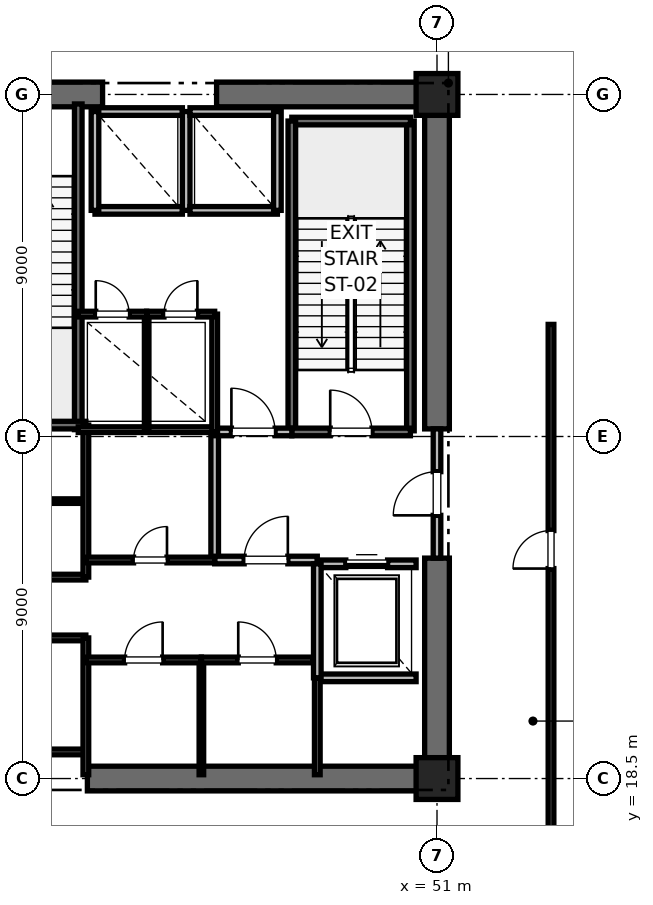
"""IFC4 building model, lengths in metres.
Left out: names, types, materials, properties, quantities, classifications, styles, units other than length and angle.
Written with IfcOpenShell. Run it as: python <this file> out.ifc"""

import sys

from ifc_helpers import new_model, si_unit, direction, frame, frame_2d, origin, origin_2d, place, context, subcontext, project, spatial, rectangle, extrude, element, fill, save


model = new_model("IFC4")
c1 = context("Model", 3, precision=1e-05, world=origin(), true_north=direction((0.0, 1.0)))
c2 = subcontext(c1, "Body", "Model", "MODEL_VIEW")
j1 = project(units=[si_unit("LENGTHUNIT", "METRE"), si_unit("PLANEANGLEUNIT", "RADIAN")], contexts=[c1])
p1 = place(None, origin())
s1 = spatial("IfcSite", under=j1, at=p1, CompositionType="ELEMENT")
p2 = place(p1, origin())
s2 = spatial("IfcBuilding", under=s1, at=p2, CompositionType="ELEMENT")
p3 = place(p2, frame((0.0, 0.0, 6.0)))
s3 = spatial("IfcBuildingStorey", under=s2, at=p3, CompositionType="ELEMENT", Elevation=6.0)
for number, where, z_axis, x_axis in (
    (1, (51.0, 18.5, 0.0), (0.0, 0.0, 1.0), (1.0, 0.0, 0.0)),
    (2, (51.0, 36.5, 0.0), (0.0, 0.0, 1.0), (1.0, 0.0, 0.0)),
):
    element("IfcColumn", number, at=place(p3, frame(where, z_axis=z_axis, x_axis=x_axis)), inside=s3, PredefinedType="PILASTER", context=c2, shape_type="SweptSolid", body=[
        extrude(rectangle(XDim=1.1, YDim=1.1, at=origin_2d()), origin(), (0.0, 0.0, 1.0), 5.2),
    ])
p4 = place(p3, frame((41.8, 18.5, 0.0), z_axis=(0.0, 0.0, 1.0), x_axis=(1.0, 0.0, 0.0)))
e3 = element("IfcWall", 3, at=p4, inside=s3, PredefinedType="SHEAR", context=c2, shape_type="SweptSolid", body=[
    extrude(rectangle(XDim=9.2, YDim=0.65, at=frame_2d((4.6, 0.0))), origin(), (0.0, 0.0, 1.0), 4.92),
])
p5 = place(p3, frame((37.8, 36.5, 0.0), z_axis=(0.0, 0.0, 1.0), x_axis=(1.0, 0.0, 0.0)))
e4 = element("IfcWall", 4, at=p5, inside=s3, PredefinedType="SHEAR", context=c2, shape_type="SweptSolid", body=[
    extrude(rectangle(XDim=4.4, YDim=0.65, at=frame_2d((2.2, 0.0))), origin(), (0.0, 0.0, 1.0), 4.92),
])
p6 = place(p5, frame((1.65, 0.0, 0.0)))
e5 = element("IfcOpeningElement", 5, at=p6, cuts=e4, PredefinedType="OPENING", context=c2, shape_type="SweptSolid", body=[
    extrude(rectangle(XDim=1.1, YDim=2.15, at=frame_2d((0.55, 1.075))), frame((0.0, 0.325, 0.0), z_axis=(0.0, -1.0, 0.0), x_axis=(1.0, 0.0, 0.0)), (0.0, 0.0, 1.0), 0.65),
])
for number, where, z_axis, x_axis in (
    (6, (45.2, 36.5, 0.0), (0.0, 0.0, 1.0), (1.0, 0.0, 0.0)),
    (7, (51.0, 18.5, 0.0), (0.0, 0.0, 1.0), (0.0, 1.0, 0.0)),
):
    element("IfcWall", number, at=place(p3, frame(where, z_axis=z_axis, x_axis=x_axis)), inside=s3, PredefinedType="SHEAR", context=c2, shape_type="SweptSolid", body=[
        extrude(rectangle(XDim=5.8, YDim=0.65, at=frame_2d((2.9, 0.0))), origin(), (0.0, 0.0, 1.0), 4.92),
    ])
p7 = place(p3, frame((51.0, 27.7, 0.0), z_axis=(0.0, 0.0, 1.0), x_axis=(0.0, 1.0, 0.0)))
e8 = element("IfcWall", 8, at=p7, inside=s3, PredefinedType="SHEAR", context=c2, shape_type="SweptSolid", body=[
    extrude(rectangle(XDim=8.8, YDim=0.65, at=frame_2d((4.4, 0.0))), origin(), (0.0, 0.0, 1.0), 4.92),
])
p8 = place(p3, frame((50.3, 27.65, 0.0), z_axis=(0.0, 0.0, 1.0), x_axis=(0.0, 1.0, 0.0)))
e9 = element("IfcWall", 9, at=p8, inside=s3, PredefinedType="SOLIDWALL", context=c2, shape_type="SweptSolid", body=[
    extrude(rectangle(XDim=8.15, YDim=0.2, at=frame_2d((4.075, 0.0))), origin(), (0.0, 0.0, 1.0), 4.92),
])
p9 = place(p3, frame((47.18, 35.8, 0.0), z_axis=(0.0, 0.0, 1.0), x_axis=(1.0, 0.0, 0.0)))
e10 = element("IfcWall", 10, at=p9, inside=s3, PredefinedType="SOLIDWALL", context=c2, shape_type="SweptSolid", body=[
    extrude(rectangle(XDim=3.12, YDim=0.2, at=frame_2d((1.56, 0.0))), origin(), (0.0, 0.0, 1.0), 4.92),
])
p10 = place(p3, frame((47.18, 27.62, 0.0), z_axis=(0.0, 0.0, 1.0), x_axis=(0.0, 1.0, 0.0)))
e11 = element("IfcWall", 11, at=p10, inside=s3, PredefinedType="SOLIDWALL", context=c2, shape_type="SweptSolid", body=[
    extrude(rectangle(XDim=8.18, YDim=0.2, at=frame_2d((4.09, 0.0))), origin(), (0.0, 0.0, 1.0), 4.92),
])
p11 = place(p3, frame((47.18, 27.62, 0.0), z_axis=(0.0, 0.0, 1.0), x_axis=(1.0, 0.0, 0.0)))
e12 = element("IfcWall", 12, at=p11, inside=s3, PredefinedType="SOLIDWALL", context=c2, shape_type="SweptSolid", body=[
    extrude(rectangle(XDim=3.12, YDim=0.2, at=frame_2d((1.56, 0.0))), origin(), (0.0, 0.0, 1.0), 4.92),
])
p12 = place(p11, frame((1.01, 0.0, 0.0)))
e13 = element("IfcOpeningElement", 13, at=p12, cuts=e12, PredefinedType="OPENING", context=c2, shape_type="SweptSolid", body=[
    extrude(rectangle(XDim=1.1, YDim=2.15, at=frame_2d((0.55, 1.075))), frame((0.0, 0.1, 0.0), z_axis=(0.0, -1.0, 0.0), x_axis=(1.0, 0.0, 0.0)), (0.0, 0.0, 1.0), 0.2),
])
p13 = place(p3, frame((41.56, 27.68, 0.0), z_axis=(0.0, 0.0, 1.0), x_axis=(0.0, 1.0, 0.0)))
e14 = element("IfcWall", 14, at=p13, inside=s3, PredefinedType="SOLIDWALL", context=c2, shape_type="SweptSolid", body=[
    extrude(rectangle(XDim=8.57, YDim=0.2, at=frame_2d((4.285, 0.0))), origin(), (0.0, 0.0, 1.0), 4.92),
])
p14 = place(p3, frame((38.44, 27.8, 0.0), z_axis=(0.0, 0.0, 1.0), x_axis=(1.0, 0.0, 0.0)))
e15 = element("IfcWall", 15, at=p14, inside=s3, PredefinedType="SOLIDWALL", context=c2, shape_type="SweptSolid", body=[
    extrude(rectangle(XDim=3.32, YDim=0.2, at=frame_2d((1.66, 0.0))), origin(), (0.0, 0.0, 1.0), 4.92),
])
p15 = place(p3, frame((45.15, 24.25, 0.0), z_axis=(0.0, 0.0, 1.0), x_axis=(0.0, 1.0, 0.0)))
e16 = element("IfcWall", 16, at=p15, inside=s3, PredefinedType="PARTITIONING", context=c2, shape_type="SweptSolid", body=[
    extrude(rectangle(XDim=3.37, YDim=0.2, at=frame_2d((1.685, 0.0))), origin(), (0.0, 0.0, 1.0), 4.92),
])
p16 = place(p3, frame((45.15, 24.25, 0.0), z_axis=(0.0, 0.0, 1.0), x_axis=(1.0, 0.0, 0.0)))
e17 = element("IfcWall", 17, at=p16, inside=s3, PredefinedType="PARTITIONING", context=c2, shape_type="SweptSolid", body=[
    extrude(rectangle(XDim=2.7, YDim=0.2, at=frame_2d((1.35, 0.0))), origin(), (0.0, 0.0, 1.0), 4.92),
])
p17 = place(p16, frame((0.775, 0.0, 0.0)))
e18 = element("IfcOpeningElement", 18, at=p17, cuts=e17, PredefinedType="OPENING", context=c2, shape_type="SweptSolid", body=[
    extrude(rectangle(XDim=1.15, YDim=2.2, at=frame_2d((0.575, 1.1))), frame((0.0, 0.1, 0.0), z_axis=(0.0, -1.0, 0.0), x_axis=(1.0, 0.0, 0.0)), (0.0, 0.0, 1.0), 0.2),
])
p18 = place(p3, frame((45.15, 27.62, 0.0), z_axis=(0.0, 0.0, 1.0), x_axis=(1.0, 0.0, 0.0)))
e19 = element("IfcWall", 19, at=p18, inside=s3, PredefinedType="PARTITIONING", context=c2, shape_type="SweptSolid", body=[
    extrude(rectangle(XDim=2.03, YDim=0.2, at=frame_2d((1.015, 0.0))), origin(), (0.0, 0.0, 1.0), 4.92),
])
p19 = place(p18, frame((0.44, 0.0, 0.0)))
e20 = element("IfcOpeningElement", 20, at=p19, cuts=e19, PredefinedType="OPENING", context=c2, shape_type="SweptSolid", body=[
    extrude(rectangle(XDim=1.15, YDim=2.2, at=frame_2d((0.575, 1.1))), frame((0.0, 0.1, 0.0), z_axis=(0.0, -1.0, 0.0), x_axis=(1.0, 0.0, 0.0)), (0.0, 0.0, 1.0), 0.2),
])
p20 = place(p3, frame((51.0, 24.3, 0.0), z_axis=(0.0, 0.0, 1.0), x_axis=(0.0, 1.0, 0.0)))
e21 = element("IfcWall", 21, at=p20, inside=s3, PredefinedType="PARTITIONING", context=c2, shape_type="SweptSolid", body=[
    extrude(rectangle(XDim=3.4, YDim=0.2, at=frame_2d((1.7, 0.0))), origin(), (0.0, 0.0, 1.0), 3.7),
])
p21 = place(p20, frame((1.125, 0.0, 0.0)))
e22 = element("IfcOpeningElement", 22, at=p21, cuts=e21, PredefinedType="OPENING", context=c2, shape_type="SweptSolid", body=[
    extrude(rectangle(XDim=1.15, YDim=2.2, at=frame_2d((0.575, 1.1))), frame((0.0, 0.1, 0.0), z_axis=(0.0, -1.0, 0.0), x_axis=(1.0, 0.0, 0.0)), (0.0, 0.0, 1.0), 0.2),
])
p22 = place(p3, frame((47.85, 21.15, 0.0), z_axis=(0.0, 0.0, 1.0), x_axis=(1.0, 0.0, 0.0)))
e23 = element("IfcWall", 23, at=p22, inside=s3, PredefinedType="SOLIDWALL", context=c2, shape_type="SweptSolid", body=[
    extrude(rectangle(XDim=2.6, YDim=0.2, at=frame_2d((1.3, 0.0))), origin(), (0.0, 0.0, 1.0), 4.92),
])
p23 = place(p3, frame((50.45, 24.15, 0.0), z_axis=(0.0, 0.0, 1.0), x_axis=(-1.0, 0.0, 0.0)))
e24 = element("IfcWall", 24, at=p23, inside=s3, PredefinedType="SOLIDWALL", context=c2, shape_type="SweptSolid", body=[
    extrude(rectangle(XDim=2.6, YDim=0.2, at=frame_2d((1.3, 0.0))), origin(), (0.0, 0.0, 1.0), 3.7),
])
p24 = place(p23, frame((0.75, 0.0, 0.0)))
e25 = element("IfcOpeningElement", 25, at=p24, cuts=e24, PredefinedType="OPENING", context=c2, shape_type="SweptSolid", body=[
    extrude(rectangle(XDim=1.1, YDim=2.2, at=frame_2d((0.55, 1.1))), frame((0.0, 0.1, 0.0), z_axis=(0.0, -1.0, 0.0), x_axis=(1.0, 0.0, 0.0)), (0.0, 0.0, 1.0), 0.2),
])
p25 = place(p3, frame((47.85, 24.15, 0.0), z_axis=(0.0, 0.0, 1.0), x_axis=(0.0, -1.0, 0.0)))
e26 = element("IfcWall", 26, at=p25, inside=s3, PredefinedType="SOLIDWALL", context=c2, shape_type="SweptSolid", body=[
    extrude(rectangle(XDim=3.0, YDim=0.2, at=frame_2d((1.5, 0.0))), origin(), (0.0, 0.0, 1.0), 4.92),
])
p26 = place(p3, frame((42.0, 33.45, 0.0), z_axis=(0.0, 0.0, 1.0), x_axis=(1.0, 0.0, 0.0)))
e27 = element("IfcWall", 27, at=p26, inside=s3, PredefinedType="SOLIDWALL", context=c2, shape_type="SweptSolid", body=[
    extrude(rectangle(XDim=2.3, YDim=0.2, at=frame_2d((1.15, 0.0))), origin(), (0.0, 0.0, 1.0), 4.92),
])
p27 = place(p3, frame((44.3, 36.05, 0.0), z_axis=(0.0, 0.0, 1.0), x_axis=(-1.0, 0.0, 0.0)))
e28 = element("IfcWall", 28, at=p27, inside=s3, PredefinedType="SOLIDWALL", context=c2, shape_type="SweptSolid", body=[
    extrude(rectangle(XDim=2.3, YDim=0.2, at=frame_2d((1.15, 0.0))), origin(), (0.0, 0.0, 1.0), 3.7),
])
for number, where, z_axis, x_axis in (
    (29, (42.0, 36.05, 0.0), (0.0, 0.0, 1.0), (0.0, -1.0, 0.0)),
    (30, (44.4, 33.45, 0.0), (0.0, 0.0, 1.0), (0.0, 1.0, 0.0)),
):
    element("IfcWall", number, at=place(p3, frame(where, z_axis=z_axis, x_axis=x_axis)), inside=s3, PredefinedType="SOLIDWALL", context=c2, shape_type="SweptSolid", body=[
        extrude(rectangle(XDim=2.6, YDim=0.2, at=frame_2d((1.3, 0.0))), origin(), (0.0, 0.0, 1.0), 3.7),
    ])
p28 = place(p3, frame((44.5, 33.45, 0.0), z_axis=(0.0, 0.0, 1.0), x_axis=(1.0, 0.0, 0.0)))
e31 = element("IfcWall", 31, at=p28, inside=s3, PredefinedType="SOLIDWALL", context=c2, shape_type="SweptSolid", body=[
    extrude(rectangle(XDim=2.3, YDim=0.2, at=frame_2d((1.15, 0.0))), origin(), (0.0, 0.0, 1.0), 4.92),
])
p29 = place(p3, frame((46.8, 36.05, 0.0), z_axis=(0.0, 0.0, 1.0), x_axis=(-1.0, 0.0, 0.0)))
e32 = element("IfcWall", 32, at=p29, inside=s3, PredefinedType="SOLIDWALL", context=c2, shape_type="SweptSolid", body=[
    extrude(rectangle(XDim=2.3, YDim=0.2, at=frame_2d((1.15, 0.0))), origin(), (0.0, 0.0, 1.0), 3.7),
])
p30 = place(p3, frame((46.8, 33.45, 0.0), z_axis=(0.0, 0.0, 1.0), x_axis=(0.0, 1.0, 0.0)))
e33 = element("IfcWall", 33, at=p30, inside=s3, PredefinedType="SOLIDWALL", context=c2, shape_type="SweptSolid", body=[
    extrude(rectangle(XDim=2.6, YDim=0.2, at=frame_2d((1.3, 0.0))), origin(), (0.0, 0.0, 1.0), 4.92),
])
for number, where, z_axis, x_axis in (
    (34, (39.95, 19.2, 0.0), (0.0, 0.0, 1.0), (1.0, 0.0, 0.0)),
    (35, (39.95, 22.2, 0.0), (0.0, 0.0, 1.0), (1.0, 0.0, 0.0)),
    (36, (39.95, 23.8, 0.0), (0.0, 0.0, 1.0), (1.0, 0.0, 0.0)),
):
    element("IfcWall", number, at=place(p3, frame(where, z_axis=z_axis, x_axis=x_axis)), inside=s3, PredefinedType="PARTITIONING", context=c2, shape_type="SweptSolid", body=[
        extrude(rectangle(XDim=1.81, YDim=0.15, at=frame_2d((0.905, 0.0))), origin(), (0.0, 0.0, 1.0), 2.85),
    ])
p31 = place(p3, frame((39.95, 25.8, 0.0), z_axis=(0.0, 0.0, 1.0), x_axis=(1.0, 0.0, 0.0)))
e37 = element("IfcWall", 37, at=p31, inside=s3, PredefinedType="PARTITIONING", context=c2, shape_type="SweptSolid", body=[
    extrude(rectangle(XDim=1.81, YDim=0.12, at=frame_2d((0.905, 0.0))), origin(), (0.0, 0.0, 1.0), 2.85),
])
p32 = place(p3, frame((41.76, 18.6, 0.0), z_axis=(0.0, 0.0, 1.0), x_axis=(0.0, 1.0, 0.0)))
e38 = element("IfcWall", 38, at=p32, inside=s3, PredefinedType="PARTITIONING", context=c2, shape_type="SweptSolid", body=[
    extrude(rectangle(XDim=3.6, YDim=0.15, at=frame_2d((1.8, 0.0))), origin(), (0.0, 0.0, 1.0), 2.85),
])
p33 = place(p3, frame((41.76, 23.8, 0.0), z_axis=(0.0, 0.0, 1.0), x_axis=(0.0, 1.0, 0.0)))
e39 = element("IfcWall", 39, at=p33, inside=s3, PredefinedType="PARTITIONING", context=c2, shape_type="SweptSolid", body=[
    extrude(rectangle(XDim=4.0, YDim=0.15, at=frame_2d((2.0, 0.0))), origin(), (0.0, 0.0, 1.0), 2.85),
])
p34 = place(p3, frame((41.56, 27.68, 0.0), z_axis=(0.0, 0.0, 1.0), x_axis=(1.0, 0.0, 0.0)))
e40 = element("IfcWall", 40, at=p34, inside=s3, PredefinedType="PARTITIONING", context=c2, shape_type="SweptSolid", body=[
    extrude(rectangle(XDim=3.59, YDim=0.15, at=frame_2d((1.795, 0.0))), origin(), (0.0, 0.0, 1.0), 2.85),
])
p35 = place(p3, frame((47.85, 18.6, 0.0), z_axis=(0.0, 0.0, 1.0), x_axis=(0.0, 1.0, 0.0)))
e41 = element("IfcWall", 41, at=p35, inside=s3, PredefinedType="PARTITIONING", context=c2, shape_type="SweptSolid", body=[
    extrude(rectangle(XDim=2.54, YDim=0.15, at=frame_2d((1.27, 0.0))), origin(), (0.0, 0.0, 1.0), 2.85),
])
p36 = place(p3, frame((44.8, 18.6, 0.0), z_axis=(0.0, 0.0, 1.0), x_axis=(0.0, 1.0, 0.0)))
e42 = element("IfcWall", 42, at=p36, inside=s3, PredefinedType="PARTITIONING", context=c2, shape_type="SweptSolid", body=[
    extrude(rectangle(XDim=3.02, YDim=0.12, at=frame_2d((1.51, 0.0))), origin(), (0.0, 0.0, 1.0), 2.85),
])
p37 = place(p3, frame((41.76, 21.62, 0.0), z_axis=(0.0, 0.0, 1.0), x_axis=(1.0, 0.0, 0.0)))
e43 = element("IfcWall", 43, at=p37, inside=s3, PredefinedType="PARTITIONING", context=c2, shape_type="SweptSolid", body=[
    extrude(rectangle(XDim=3.04, YDim=0.15, at=frame_2d((1.52, 0.0))), origin(), (0.0, 0.0, 1.0), 2.85),
])
p38 = place(p37, frame((1.02, 0.0, 0.0)))
e44 = element("IfcOpeningElement", 44, at=p38, cuts=e43, PredefinedType="OPENING", context=c2, shape_type="SweptSolid", body=[
    extrude(rectangle(XDim=1.0, YDim=2.15, at=frame_2d((0.5, 1.075))), frame((0.0, 0.075, 0.0), z_axis=(0.0, -1.0, 0.0), x_axis=(1.0, 0.0, 0.0)), (0.0, 0.0, 1.0), 0.15),
])
p39 = place(p3, frame((44.8, 21.62, 0.0), z_axis=(0.0, 0.0, 1.0), x_axis=(1.0, 0.0, 0.0)))
e45 = element("IfcWall", 45, at=p39, inside=s3, PredefinedType="PARTITIONING", context=c2, shape_type="SweptSolid", body=[
    extrude(rectangle(XDim=2.94, YDim=0.15, at=frame_2d((1.47, 0.0))), origin(), (0.0, 0.0, 1.0), 2.85),
])
p40 = place(p39, frame((0.97, 0.0, 0.0)))
e46 = element("IfcOpeningElement", 46, at=p40, cuts=e45, PredefinedType="OPENING", context=c2, shape_type="SweptSolid", body=[
    extrude(rectangle(XDim=1.0, YDim=2.15, at=frame_2d((0.5, 1.075))), frame((0.0, 0.075, 0.0), z_axis=(0.0, -1.0, 0.0), x_axis=(1.0, 0.0, 0.0)), (0.0, 0.0, 1.0), 0.15),
])
p41 = place(p3, frame((41.76, 24.25, 0.0), z_axis=(0.0, 0.0, 1.0), x_axis=(1.0, 0.0, 0.0)))
e47 = element("IfcWall", 47, at=p41, inside=s3, PredefinedType="PARTITIONING", context=c2, shape_type="SweptSolid", body=[
    extrude(rectangle(XDim=3.39, YDim=0.15, at=frame_2d((1.695, 0.0))), origin(), (0.0, 0.0, 1.0), 2.85),
])
p42 = place(p41, frame((1.255, 0.0, 0.0)))
e48 = element("IfcOpeningElement", 48, at=p42, cuts=e47, PredefinedType="OPENING", context=c2, shape_type="SweptSolid", body=[
    extrude(rectangle(XDim=0.88, YDim=2.1, at=frame_2d((0.44, 1.05))), frame((0.0, 0.075, 0.0), z_axis=(0.0, -1.0, 0.0), x_axis=(1.0, 0.0, 0.0)), (0.0, 0.0, 1.0), 0.15),
])
p43 = place(p3, frame((45.15, 27.62, 0.0), z_axis=(0.0, 0.0, 1.0), x_axis=(0.0, 1.0, 0.0)))
e49 = element("IfcWall", 49, at=p43, inside=s3, PredefinedType="PARTITIONING", context=c2, shape_type="SweptSolid", body=[
    extrude(rectangle(XDim=3.1, YDim=0.15, at=frame_2d((1.55, 0.0))), origin(), (0.0, 0.0, 1.0), 2.85),
])
p44 = place(p3, frame((43.36, 27.68, 0.0), z_axis=(0.0, 0.0, 1.0), x_axis=(0.0, 1.0, 0.0)))
e50 = element("IfcWall", 50, at=p44, inside=s3, PredefinedType="PARTITIONING", context=c2, shape_type="SweptSolid", body=[
    extrude(rectangle(XDim=3.04, YDim=0.12, at=frame_2d((1.52, 0.0))), origin(), (0.0, 0.0, 1.0), 2.85),
])
p45 = place(p3, frame((41.56, 30.72, 0.0), z_axis=(0.0, 0.0, 1.0), x_axis=(1.0, 0.0, 0.0)))
e51 = element("IfcWall", 51, at=p45, inside=s3, PredefinedType="PARTITIONING", context=c2, shape_type="SweptSolid", body=[
    extrude(rectangle(XDim=1.8, YDim=0.15, at=frame_2d((0.9, 0.0))), origin(), (0.0, 0.0, 1.0), 2.85),
])
p46 = place(p45, frame((0.46, 0.0, 0.0)))
e52 = element("IfcOpeningElement", 52, at=p46, cuts=e51, PredefinedType="OPENING", context=c2, shape_type="SweptSolid", body=[
    extrude(rectangle(XDim=0.88, YDim=2.1, at=frame_2d((0.44, 1.05))), frame((0.0, 0.075, 0.0), z_axis=(0.0, -1.0, 0.0), x_axis=(1.0, 0.0, 0.0)), (0.0, 0.0, 1.0), 0.15),
])
p47 = place(p3, frame((43.36, 30.72, 0.0), z_axis=(0.0, 0.0, 1.0), x_axis=(1.0, 0.0, 0.0)))
e53 = element("IfcWall", 53, at=p47, inside=s3, PredefinedType="PARTITIONING", context=c2, shape_type="SweptSolid", body=[
    extrude(rectangle(XDim=1.79, YDim=0.15, at=frame_2d((0.895, 0.0))), origin(), (0.0, 0.0, 1.0), 2.85),
])
p48 = place(p47, frame((0.455, 0.0, 0.0)))
e54 = element("IfcOpeningElement", 54, at=p48, cuts=e53, PredefinedType="OPENING", context=c2, shape_type="SweptSolid", body=[
    extrude(rectangle(XDim=0.88, YDim=2.1, at=frame_2d((0.44, 1.05))), frame((0.0, 0.075, 0.0), z_axis=(0.0, -1.0, 0.0), x_axis=(1.0, 0.0, 0.0)), (0.0, 0.0, 1.0), 0.15),
])
p49 = place(p3, frame((54.0, 16.0, 0.0), z_axis=(0.0, 0.0, 1.0), x_axis=(0.0, 1.0, 0.0)))
e55 = element("IfcWall", 55, at=p49, inside=s3, PredefinedType="PARTITIONING", context=c2, shape_type="SweptSolid", body=[
    extrude(rectangle(XDim=14.45, YDim=0.15, at=frame_2d((7.225, 0.0))), origin(), (0.0, 0.0, 1.0), 2.85),
])
p50 = place(p49, frame((8.025, 0.0, 0.0)))
e56 = element("IfcOpeningElement", 56, at=p50, cuts=e55, PredefinedType="OPENING", context=c2, shape_type="SweptSolid", body=[
    extrude(rectangle(XDim=1.0, YDim=2.15, at=frame_2d((0.5, 1.075))), frame((0.0, 0.075, 0.0), z_axis=(0.0, -1.0, 0.0), x_axis=(1.0, 0.0, 0.0)), (0.0, 0.0, 1.0), 0.15),
])
p51 = place(p12, origin())
e57 = element("IfcDoor", 57, at=p51, inside=s3, OperationType="SINGLE_SWING_LEFT", PredefinedType="DOOR", context=c2, shape_type="SweptSolid", body=[
    extrude(rectangle(XDim=1.1, YDim=2.15, at=frame_2d((0.55, 1.075))), frame((0.0, 0.025, 0.0), z_axis=(0.0, -1.0, 0.0), x_axis=(1.0, 0.0, 0.0)), (0.0, 0.0, 1.0), 0.05),
])
fill(e13, e57)
p52 = place(p17, origin())
e58 = element("IfcDoor", 58, at=p52, inside=s3, OperationType="SINGLE_SWING_RIGHT", PredefinedType="DOOR", context=c2, shape_type="SweptSolid", body=[
    extrude(rectangle(XDim=1.15, YDim=2.2, at=frame_2d((0.575, 1.1))), frame((0.0, 0.025, 0.0), z_axis=(0.0, -1.0, 0.0), x_axis=(1.0, 0.0, 0.0)), (0.0, 0.0, 1.0), 0.05),
])
fill(e18, e58)
p53 = place(p19, origin())
e59 = element("IfcDoor", 59, at=p53, inside=s3, OperationType="SINGLE_SWING_LEFT", PredefinedType="DOOR", context=c2, shape_type="SweptSolid", body=[
    extrude(rectangle(XDim=1.15, YDim=2.2, at=frame_2d((0.575, 1.1))), frame((0.0, 0.025, 0.0), z_axis=(0.0, -1.0, 0.0), x_axis=(1.0, 0.0, 0.0)), (0.0, 0.0, 1.0), 0.05),
])
fill(e20, e59)
p54 = place(p21, origin())
e60 = element("IfcDoor", 60, at=p54, inside=s3, OperationType="SINGLE_SWING_LEFT", PredefinedType="DOOR", context=c2, shape_type="SweptSolid", body=[
    extrude(rectangle(XDim=1.15, YDim=2.2, at=frame_2d((0.575, 1.1))), frame((0.0, 0.025, 0.0), z_axis=(0.0, -1.0, 0.0), x_axis=(1.0, 0.0, 0.0)), (0.0, 0.0, 1.0), 0.05),
])
fill(e22, e60)
p55 = place(p24, origin())
e61 = element("IfcDoor", 61, at=p55, inside=s3, OperationType="SLIDING_TO_RIGHT", PredefinedType="DOOR", context=c2, shape_type="SweptSolid", body=[
    extrude(rectangle(XDim=1.1, YDim=2.2, at=frame_2d((0.55, 1.1))), frame((0.0, 0.025, 0.0), z_axis=(0.0, -1.0, 0.0), x_axis=(1.0, 0.0, 0.0)), (0.0, 0.0, 1.0), 0.05),
])
fill(e25, e61)
p56 = place(p38, origin())
e62 = element("IfcDoor", 62, at=p56, inside=s3, OperationType="SINGLE_SWING_RIGHT", PredefinedType="DOOR", context=c2, shape_type="SweptSolid", body=[
    extrude(rectangle(XDim=1.0, YDim=2.15, at=frame_2d((0.5, 1.075))), frame((0.0, 0.025, 0.0), z_axis=(0.0, -1.0, 0.0), x_axis=(1.0, 0.0, 0.0)), (0.0, 0.0, 1.0), 0.05),
])
fill(e44, e62)
p57 = place(p40, origin())
e63 = element("IfcDoor", 63, at=p57, inside=s3, OperationType="SINGLE_SWING_LEFT", PredefinedType="DOOR", context=c2, shape_type="SweptSolid", body=[
    extrude(rectangle(XDim=1.0, YDim=2.15, at=frame_2d((0.5, 1.075))), frame((0.0, 0.025, 0.0), z_axis=(0.0, -1.0, 0.0), x_axis=(1.0, 0.0, 0.0)), (0.0, 0.0, 1.0), 0.05),
])
fill(e46, e63)
p58 = place(p42, origin())
e64 = element("IfcDoor", 64, at=p58, inside=s3, OperationType="SINGLE_SWING_RIGHT", PredefinedType="DOOR", context=c2, shape_type="SweptSolid", body=[
    extrude(rectangle(XDim=0.88, YDim=2.1, at=frame_2d((0.44, 1.05))), frame((0.0, 0.025, 0.0), z_axis=(0.0, -1.0, 0.0), x_axis=(1.0, 0.0, 0.0)), (0.0, 0.0, 1.0), 0.05),
])
fill(e48, e64)
p59 = place(p46, origin())
e65 = element("IfcDoor", 65, at=p59, inside=s3, OperationType="SINGLE_SWING_LEFT", PredefinedType="DOOR", context=c2, shape_type="SweptSolid", body=[
    extrude(rectangle(XDim=0.88, YDim=2.1, at=frame_2d((0.44, 1.05))), frame((0.0, 0.025, 0.0), z_axis=(0.0, -1.0, 0.0), x_axis=(1.0, 0.0, 0.0)), (0.0, 0.0, 1.0), 0.05),
])
fill(e52, e65)
p60 = place(p48, origin())
e66 = element("IfcDoor", 66, at=p60, inside=s3, OperationType="SINGLE_SWING_RIGHT", PredefinedType="DOOR", context=c2, shape_type="SweptSolid", body=[
    extrude(rectangle(XDim=0.88, YDim=2.1, at=frame_2d((0.44, 1.05))), frame((0.0, 0.025, 0.0), z_axis=(0.0, -1.0, 0.0), x_axis=(1.0, 0.0, 0.0)), (0.0, 0.0, 1.0), 0.05),
])
fill(e54, e66)
p61 = place(p50, origin())
e67 = element("IfcDoor", 67, at=p61, inside=s3, OperationType="SINGLE_SWING_LEFT", PredefinedType="DOOR", context=c2, shape_type="SweptSolid", body=[
    extrude(rectangle(XDim=1.0, YDim=2.15, at=frame_2d((0.5, 1.075))), frame((0.0, 0.025, 0.0), z_axis=(0.0, -1.0, 0.0), x_axis=(1.0, 0.0, 0.0)), (0.0, 0.0, 1.0), 0.05),
])
fill(e56, e67)
save(model, sys.argv[1])
